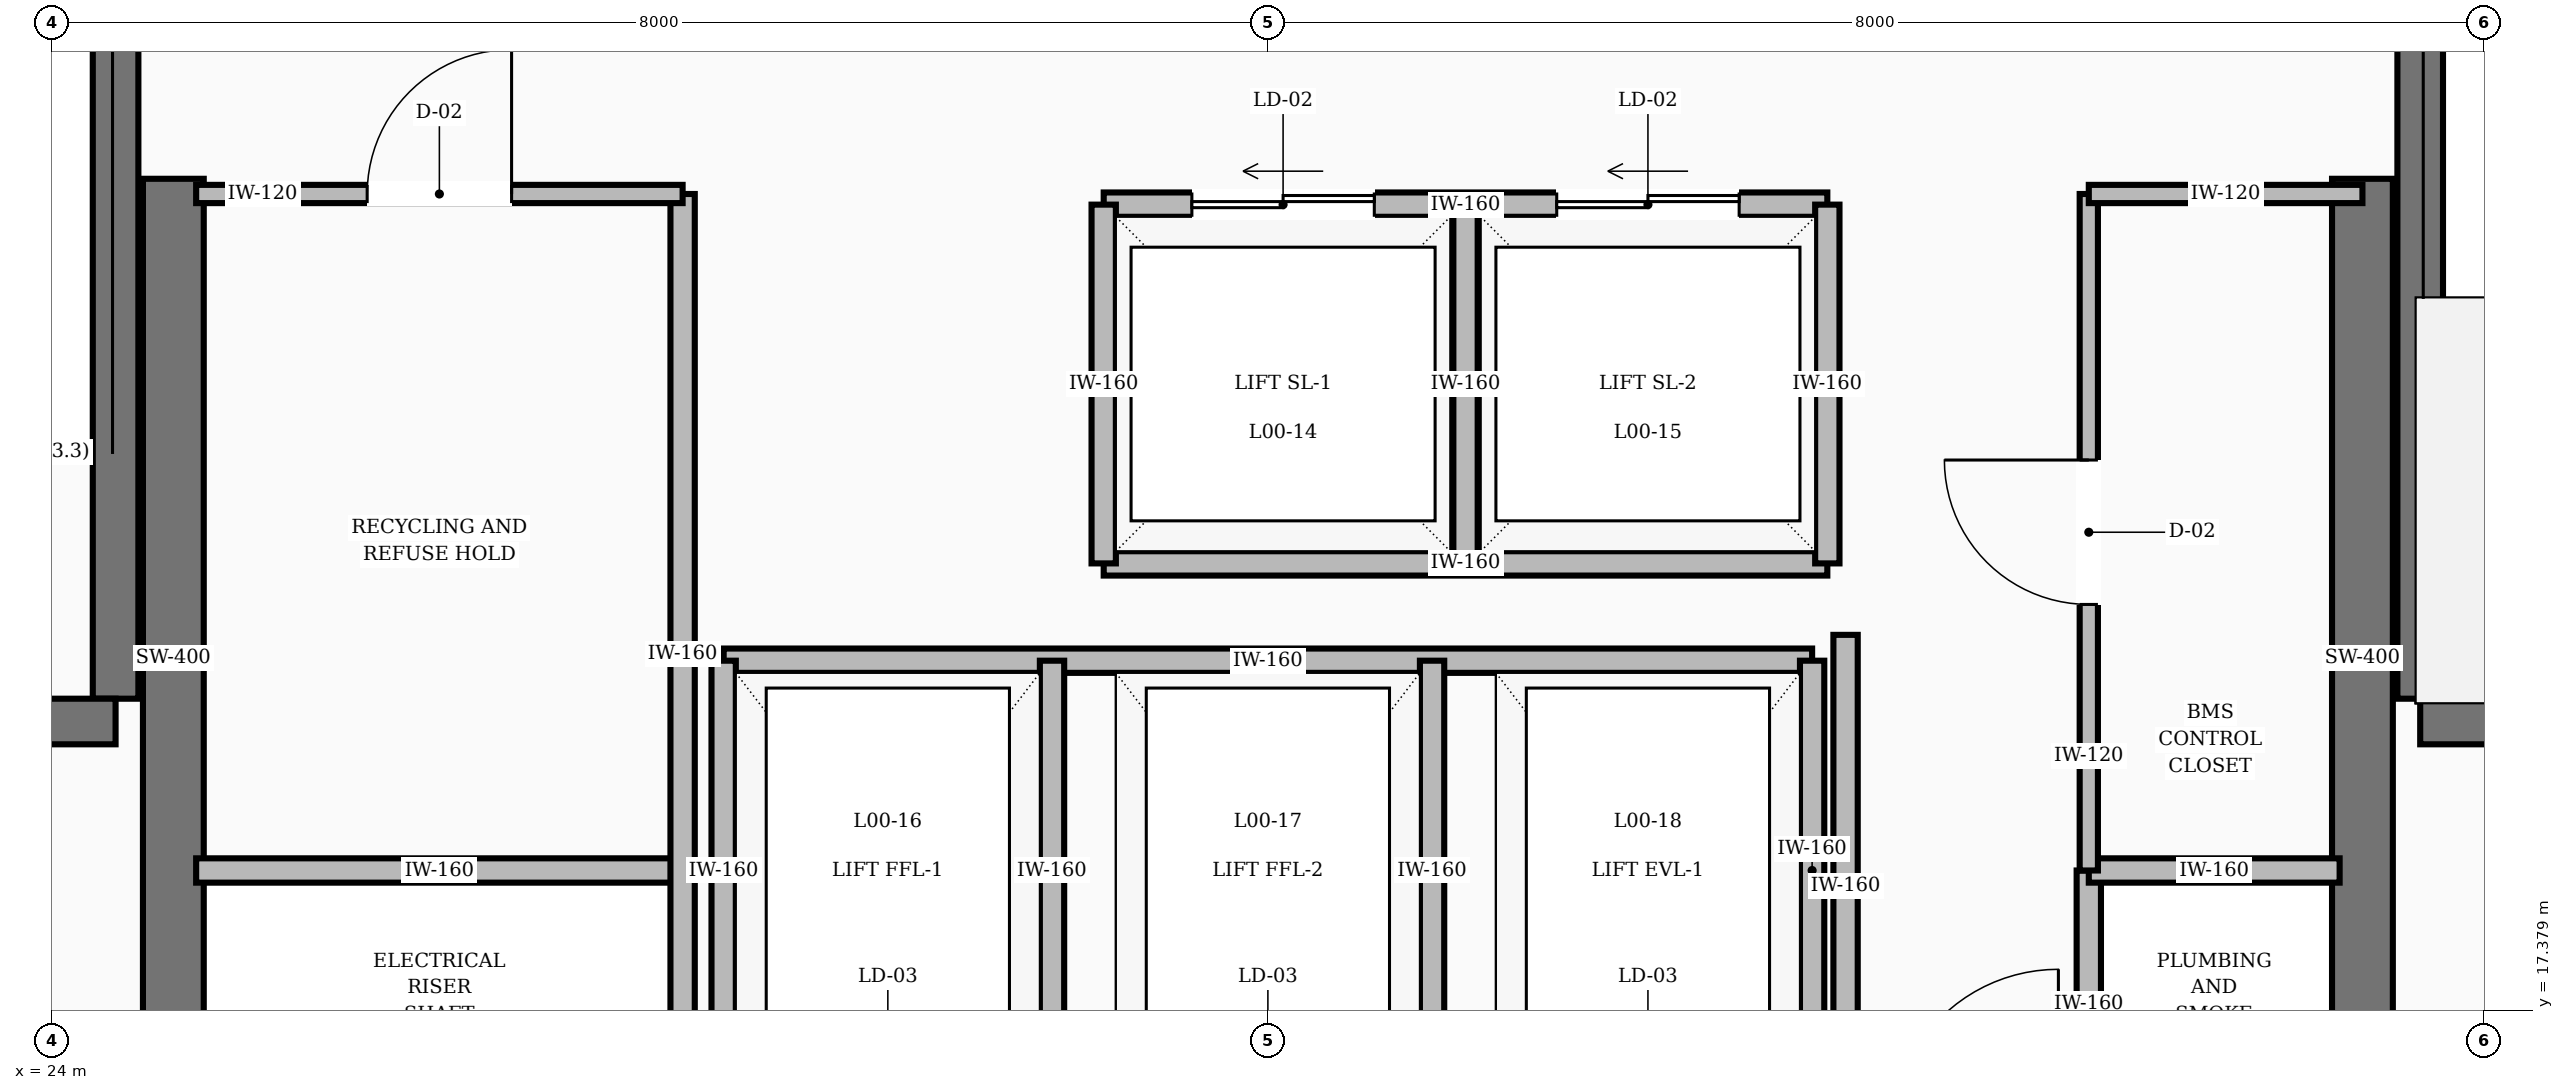
"""IFC4 building model, lengths in metres.
Left out: names, types, materials, properties, quantities, classifications, styles, units other than length and angle.
Written with IfcOpenShell. Run it as: python <this file> out.ifc"""

import sys

from ifc_helpers import new_model, si_unit, direction, frame, frame_2d, origin, place, context, subcontext, project, spatial, rectangle, extrude, element, fill, save


model = new_model("IFC4")
c1 = context("Model", 3, precision=1e-05, world=origin(), true_north=direction((0.0, 1.0)))
c2 = subcontext(c1, "Body", "Model", "MODEL_VIEW")
j1 = project(units=[si_unit("LENGTHUNIT", "METRE"), si_unit("PLANEANGLEUNIT", "RADIAN")], contexts=[c1])
p1 = place(None, origin())
s1 = spatial("IfcSite", under=j1, at=p1, CompositionType="ELEMENT")
p2 = place(p1, origin())
s2 = spatial("IfcBuilding", under=s1, at=p2, CompositionType="ELEMENT")
p3 = place(p2, origin())
s3 = spatial("IfcBuildingStorey", under=s2, at=p3, CompositionType="ELEMENT", Elevation=0.0)
for number, where, z_axis, x_axis in (
    (1, (24.8, 16.55, 0.0), (0.0, 0.0, 1.0), (0.0, 1.0, 0.0)),
    (2, (39.2, 16.55, 0.0), (0.0, 0.0, 1.0), (0.0, 1.0, 0.0)),
):
    element("IfcWall", number, at=place(p3, frame(where, z_axis=z_axis, x_axis=x_axis)), inside=s3, PredefinedType="SHEAR", context=c2, shape_type="SweptSolid", body=[
        extrude(rectangle(XDim=6.3, YDim=0.4, at=frame_2d((3.15, 0.0))), origin(), (0.0, 0.0, 1.0), 5.2),
    ])
p4 = place(p3, frame((24.42, 19.43, 0.0), z_axis=(0.0, 0.0, 1.0), x_axis=(0.0, 1.0, 0.0)))
e3 = element("IfcWall", 3, at=p4, inside=s3, PredefinedType="SHEAR", context=c2, shape_type="SweptSolid", body=[
    extrude(rectangle(XDim=8.74, YDim=0.3, at=frame_2d((4.37, 0.0))), origin(), (0.0, 0.0, 1.0), 5.2),
])
p5 = place(p3, frame((20.82, 19.28, 0.0), z_axis=(0.0, 0.0, 1.0), x_axis=(1.0, 0.0, 0.0)))
e4 = element("IfcWall", 4, at=p5, inside=s3, PredefinedType="SHEAR", context=c2, shape_type="SweptSolid", body=[
    extrude(rectangle(XDim=3.6, YDim=0.3, at=frame_2d((1.8, 0.0))), origin(), (0.0, 0.0, 1.0), 5.2),
])
p6 = place(p5, frame((1.3, 0.0, 0.0)))
e5 = element("IfcOpeningElement", 5, at=p6, cuts=e4, PredefinedType="OPENING", context=c2, shape_type="SweptSolid", body=[
    extrude(rectangle(XDim=1.1, YDim=2.1, at=frame_2d((0.55, 1.05))), frame((0.0, 0.16, 0.0), z_axis=(0.0, -1.0, 0.0), x_axis=(1.0, 0.0, 0.0)), (0.0, 0.0, 1.0), 0.32),
])
p7 = place(p3, frame((39.58, 19.43, 0.0), z_axis=(0.0, 0.0, 1.0), x_axis=(0.0, 1.0, 0.0)))
e6 = element("IfcWall", 6, at=p7, inside=s3, PredefinedType="SHEAR", context=c2, shape_type="SweptSolid", body=[
    extrude(rectangle(XDim=8.74, YDim=0.3, at=frame_2d((4.37, 0.0))), origin(), (0.0, 0.0, 1.0), 5.2),
])
p8 = place(p3, frame((39.58, 19.28, 0.0), z_axis=(0.0, 0.0, 1.0), x_axis=(1.0, 0.0, 0.0)))
e7 = element("IfcWall", 7, at=p8, inside=s3, PredefinedType="SHEAR", context=c2, shape_type="SweptSolid", body=[
    extrude(rectangle(XDim=3.6, YDim=0.3, at=frame_2d((1.8, 0.0))), origin(), (0.0, 0.0, 1.0), 5.2),
])
p9 = place(p3, frame((35.8, 16.55, 0.0), z_axis=(0.0, 0.0, 1.0), x_axis=(0.0, 1.0, 0.0)))
e8 = element("IfcWall", 8, at=p9, inside=s3, PredefinedType="SOLIDWALL", context=c2, shape_type="SweptSolid", body=[
    extrude(rectangle(XDim=3.3, YDim=0.16, at=frame_2d((1.65, 0.0))), origin(), (0.0, 0.0, 1.0), 3.92),
])
p10 = place(p3, frame((37.4, 16.55, 0.0), z_axis=(0.0, 0.0, 1.0), x_axis=(0.0, 1.0, 0.0)))
e9 = element("IfcWall", 9, at=p10, inside=s3, PredefinedType="SOLIDWALL", context=c2, shape_type="SweptSolid", body=[
    extrude(rectangle(XDim=1.75, YDim=0.16, at=frame_2d((0.875, 0.0))), origin(), (0.0, 0.0, 1.0), 3.92),
])
p11 = place(p3, frame((30.92, 22.68, 0.0), z_axis=(0.0, 0.0, 1.0), x_axis=(1.0, 0.0, 0.0)))
e10 = element("IfcWall", 10, at=p11, inside=s3, PredefinedType="SOLIDWALL", context=c2, shape_type="SweptSolid", body=[
    extrude(rectangle(XDim=4.76, YDim=0.16, at=frame_2d((2.38, 0.0))), origin(), (0.0, 0.0, 1.0), 3.92),
])
p12 = place(p11, frame((0.58, 0.0, 0.0)))
e11 = element("IfcOpeningElement", 11, at=p12, cuts=e10, PredefinedType="OPENING", context=c2, shape_type="SweptSolid", body=[
    extrude(rectangle(XDim=1.2, YDim=2.15, at=frame_2d((0.6, 1.075))), frame((0.0, 0.09, 0.0), z_axis=(0.0, -1.0, 0.0), x_axis=(1.0, 0.0, 0.0)), (0.0, 0.0, 1.0), 0.18),
])
p13 = place(p11, frame((2.98, 0.0, 0.0)))
e12 = element("IfcOpeningElement", 12, at=p13, cuts=e10, PredefinedType="OPENING", context=c2, shape_type="SweptSolid", body=[
    extrude(rectangle(XDim=1.2, YDim=2.15, at=frame_2d((0.6, 1.075))), frame((0.0, 0.09, 0.0), z_axis=(0.0, -1.0, 0.0), x_axis=(1.0, 0.0, 0.0)), (0.0, 0.0, 1.0), 0.18),
])
p14 = place(p3, frame((30.92, 20.32, 0.0), z_axis=(0.0, 0.0, 1.0), x_axis=(1.0, 0.0, 0.0)))
e13 = element("IfcWall", 13, at=p14, inside=s3, PredefinedType="SOLIDWALL", context=c2, shape_type="SweptSolid", body=[
    extrude(rectangle(XDim=4.76, YDim=0.16, at=frame_2d((2.38, 0.0))), origin(), (0.0, 0.0, 1.0), 3.92),
])
for number, where, z_axis, x_axis in (
    (14, (30.92, 20.32, 0.0), (0.0, 0.0, 1.0), (0.0, 1.0, 0.0)),
    (15, (33.3, 20.32, 0.0), (0.0, 0.0, 1.0), (0.0, 1.0, 0.0)),
    (16, (35.68, 20.32, 0.0), (0.0, 0.0, 1.0), (0.0, 1.0, 0.0)),
):
    element("IfcWall", number, at=place(p3, frame(where, z_axis=z_axis, x_axis=x_axis)), inside=s3, PredefinedType="SOLIDWALL", context=c2, shape_type="SweptSolid", body=[
        extrude(rectangle(XDim=2.36, YDim=0.16, at=frame_2d((1.18, 0.0))), origin(), (0.0, 0.0, 1.0), 3.92),
    ])
p15 = place(p3, frame((28.42, 19.68, 0.0), z_axis=(0.0, 0.0, 1.0), x_axis=(1.0, 0.0, 0.0)))
e17 = element("IfcWall", 17, at=p15, inside=s3, PredefinedType="SOLIDWALL", context=c2, shape_type="SweptSolid", body=[
    extrude(rectangle(XDim=7.16, YDim=0.16, at=frame_2d((3.58, 0.0))), origin(), (0.0, 0.0, 1.0), 3.92),
])
for number, where, z_axis, x_axis in (
    (18, (28.42, 16.92, 0.0), (0.0, 0.0, 1.0), (0.0, 1.0, 0.0)),
    (19, (30.58, 16.92, 0.0), (0.0, 0.0, 1.0), (0.0, 1.0, 0.0)),
    (20, (33.08, 16.92, 0.0), (0.0, 0.0, 1.0), (0.0, 1.0, 0.0)),
    (21, (35.58, 16.92, 0.0), (0.0, 0.0, 1.0), (0.0, 1.0, 0.0)),
):
    element("IfcWall", number, at=place(p3, frame(where, z_axis=z_axis, x_axis=x_axis)), inside=s3, PredefinedType="SOLIDWALL", context=c2, shape_type="SweptSolid", body=[
        extrude(rectangle(XDim=2.76, YDim=0.16, at=frame_2d((1.38, 0.0))), origin(), (0.0, 0.0, 1.0), 3.92),
    ])
p16 = place(p3, frame((24.95, 18.3, 0.0), z_axis=(0.0, 0.0, 1.0), x_axis=(1.0, 0.0, 0.0)))
e22 = element("IfcWall", 22, at=p16, inside=s3, PredefinedType="SOLIDWALL", context=c2, shape_type="SweptSolid", body=[
    extrude(rectangle(XDim=3.2, YDim=0.16, at=frame_2d((1.6, 0.0))), origin(), (0.0, 0.0, 1.0), 3.92),
])
p17 = place(p3, frame((28.15, 16.7, 0.0), z_axis=(0.0, 0.0, 1.0), x_axis=(0.0, 1.0, 0.0)))
e23 = element("IfcWall", 23, at=p17, inside=s3, PredefinedType="SOLIDWALL", context=c2, shape_type="SweptSolid", body=[
    extrude(rectangle(XDim=6.05, YDim=0.16, at=frame_2d((3.025, 0.0))), origin(), (0.0, 0.0, 1.0), 3.92),
])
p18 = place(p3, frame((37.4, 18.3, 0.0), z_axis=(0.0, 0.0, 1.0), x_axis=(1.0, 0.0, 0.0)))
e24 = element("IfcWall", 24, at=p18, inside=s3, PredefinedType="SOLIDWALL", context=c2, shape_type="SweptSolid", body=[
    extrude(rectangle(XDim=1.65, YDim=0.16, at=frame_2d((0.825, 0.0))), origin(), (0.0, 0.0, 1.0), 3.92),
])
p19 = place(p3, frame((24.95, 22.75, 0.0), z_axis=(0.0, 0.0, 1.0), x_axis=(1.0, 0.0, 0.0)))
e25 = element("IfcWall", 25, at=p19, inside=s3, PredefinedType="PARTITIONING", context=c2, shape_type="SweptSolid", body=[
    extrude(rectangle(XDim=3.2, YDim=0.12, at=frame_2d((1.6, 0.0))), origin(), (0.0, 0.0, 1.0), 3.92),
])
p20 = place(p19, frame((1.125, 0.0, 0.0)))
e26 = element("IfcOpeningElement", 26, at=p20, cuts=e25, PredefinedType="OPENING", context=c2, shape_type="SweptSolid", body=[
    extrude(rectangle(XDim=0.95, YDim=2.1, at=frame_2d((0.475, 1.05))), frame((0.0, 0.07, 0.0), z_axis=(0.0, -1.0, 0.0), x_axis=(1.0, 0.0, 0.0)), (0.0, 0.0, 1.0), 0.14),
])
p21 = place(p3, frame((37.4, 18.3, 0.0), z_axis=(0.0, 0.0, 1.0), x_axis=(0.0, 1.0, 0.0)))
e27 = element("IfcWall", 27, at=p21, inside=s3, PredefinedType="PARTITIONING", context=c2, shape_type="SweptSolid", body=[
    extrude(rectangle(XDim=4.45, YDim=0.12, at=frame_2d((2.225, 0.0))), origin(), (0.0, 0.0, 1.0), 3.92),
])
p22 = place(p21, frame((1.75, 0.0, 0.0)))
e28 = element("IfcOpeningElement", 28, at=p22, cuts=e27, PredefinedType="OPENING", context=c2, shape_type="SweptSolid", body=[
    extrude(rectangle(XDim=0.95, YDim=2.1, at=frame_2d((0.475, 1.05))), frame((0.0, 0.07, 0.0), z_axis=(0.0, -1.0, 0.0), x_axis=(1.0, 0.0, 0.0)), (0.0, 0.0, 1.0), 0.14),
])
p23 = place(p3, frame((37.4, 22.75, 0.0), z_axis=(0.0, 0.0, 1.0), x_axis=(1.0, 0.0, 0.0)))
e29 = element("IfcWall", 29, at=p23, inside=s3, PredefinedType="PARTITIONING", context=c2, shape_type="SweptSolid", body=[
    extrude(rectangle(XDim=1.8, YDim=0.12, at=frame_2d((0.9, 0.0))), origin(), (0.0, 0.0, 1.0), 3.92),
])
p24 = place(p12, origin())
e30 = element("IfcDoor", 30, at=p24, inside=s3, OperationType="SLIDING_TO_LEFT", PredefinedType="DOOR", context=c2, shape_type="SweptSolid", body=[
    extrude(rectangle(XDim=1.2, YDim=2.15, at=frame_2d((0.6, 1.075))), frame((0.0, 0.025, 0.0), z_axis=(0.0, -1.0, 0.0), x_axis=(1.0, 0.0, 0.0)), (0.0, 0.0, 1.0), 0.05),
])
fill(e11, e30)
p25 = place(p13, origin())
e31 = element("IfcDoor", 31, at=p25, inside=s3, OperationType="SLIDING_TO_LEFT", PredefinedType="DOOR", context=c2, shape_type="SweptSolid", body=[
    extrude(rectangle(XDim=1.2, YDim=2.15, at=frame_2d((0.6, 1.075))), frame((0.0, 0.025, 0.0), z_axis=(0.0, -1.0, 0.0), x_axis=(1.0, 0.0, 0.0)), (0.0, 0.0, 1.0), 0.05),
])
fill(e12, e31)
p26 = place(p20, origin())
e32 = element("IfcDoor", 32, at=p26, inside=s3, OperationType="SINGLE_SWING_RIGHT", PredefinedType="DOOR", context=c2, shape_type="SweptSolid", body=[
    extrude(rectangle(XDim=0.95, YDim=2.1, at=frame_2d((0.475, 1.05))), frame((0.0, 0.025, 0.0), z_axis=(0.0, -1.0, 0.0), x_axis=(1.0, 0.0, 0.0)), (0.0, 0.0, 1.0), 0.05),
])
fill(e26, e32)
p27 = place(p22, origin())
e33 = element("IfcDoor", 33, at=p27, inside=s3, OperationType="SINGLE_SWING_RIGHT", PredefinedType="DOOR", context=c2, shape_type="SweptSolid", body=[
    extrude(rectangle(XDim=0.95, YDim=2.1, at=frame_2d((0.475, 1.05))), frame((0.0, 0.025, 0.0), z_axis=(0.0, -1.0, 0.0), x_axis=(1.0, 0.0, 0.0)), (0.0, 0.0, 1.0), 0.05),
])
fill(e28, e33)
save(model, sys.argv[1])
